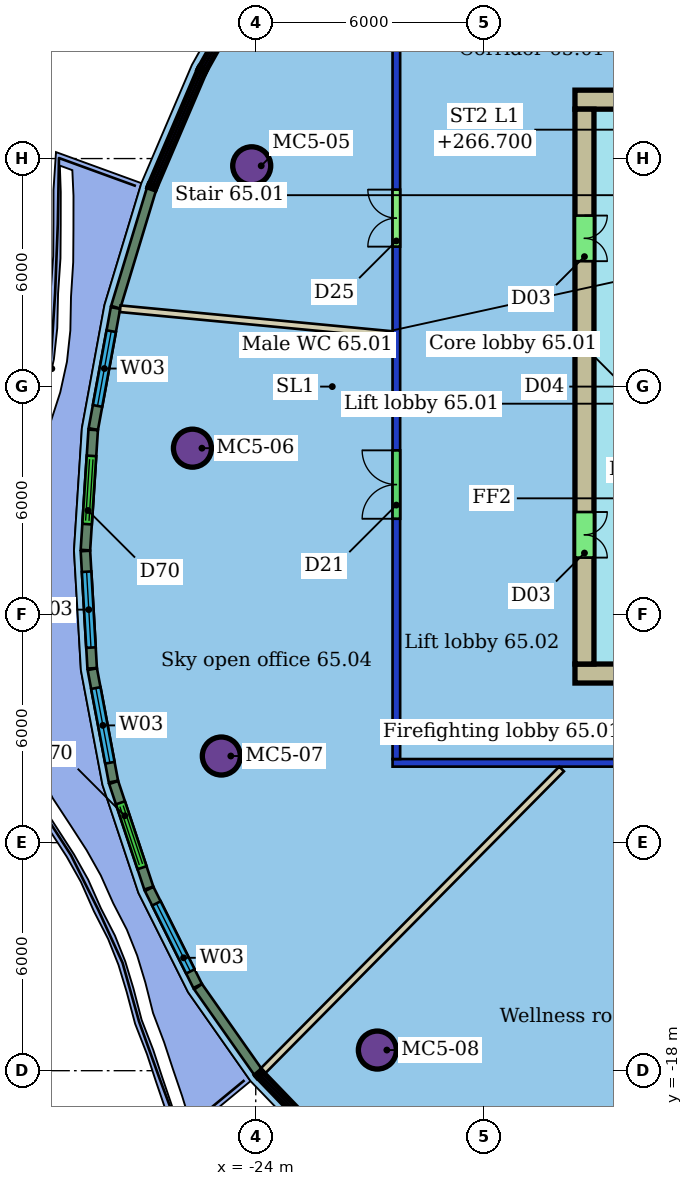
"""IFC4 building model, lengths in metres.
Left out: names, types, materials, properties, quantities, classifications, styles, units other than length and angle.
Written with IfcOpenShell. Run it as: python <this file> out.ifc"""

import sys

from ifc_helpers import new_model, si_unit, direction, frame, frame_2d, origin, origin_2d, place, context, subcontext, project, spatial, rectangle, hollow_circle, extrude, element, fill, save


model = new_model("IFC4")
c1 = context("Model", 3, precision=1e-05, world=origin(), true_north=direction((0.0, 1.0)))
c2 = subcontext(c1, "Body", "Model", "MODEL_VIEW")
j1 = project(units=[si_unit("LENGTHUNIT", "METRE"), si_unit("PLANEANGLEUNIT", "RADIAN")], contexts=[c1])
p1 = place(None, origin())
s1 = spatial("IfcSite", under=j1, at=p1, CompositionType="ELEMENT")
p2 = place(p1, origin())
s2 = spatial("IfcBuilding", under=s1, at=p2, CompositionType="ELEMENT")
p3 = place(p2, frame((0.0, 0.0, 264.9)))
s3 = spatial("IfcBuildingStorey", under=s2, at=p3, CompositionType="ELEMENT", Elevation=264.9)
for number, where, z_axis, x_axis in (
    (1, (-24.106, 5.81, 0.0), (0.0, 0.0, 1.0), (1.0, 0.0, 0.0)),
    (2, (-25.666, -1.62, 0.0), (0.0, 0.0, 1.0), (1.0, 0.0, 0.0)),
    (3, (-24.906, -9.72, 0.0), (0.0, 0.0, 1.0), (1.0, 0.0, 0.0)),
    (4, (-20.8, -17.457, 0.0), (0.0, 0.0, 1.0), (1.0, 0.0, 0.0)),
):
    element("IfcColumn", number, at=place(p3, frame(where, z_axis=z_axis, x_axis=x_axis)), inside=s3, PredefinedType="COLUMN", context=c2, shape_type="SweptSolid", body=[
        extrude(hollow_circle(Radius=0.5, WallThickness=0.04, at=origin_2d()), origin(), (0.0, 0.0, 1.0), 3.45),
    ])
p4 = place(p3, frame((8.4, -9.9, 0.0), z_axis=(0.0, 0.0, 1.0), x_axis=(-1.0, 0.0, 0.0)))
e5 = element("IfcWall", 5, at=p4, inside=s3, PredefinedType="PARTITIONING", context=c2, shape_type="SweptSolid", body=[
    extrude(rectangle(XDim=28.8, YDim=0.2, at=frame_2d((14.4, 0.0))), origin(), (0.0, 0.0, 1.0), 3.1),
])
p5 = place(p4, frame((18.96, 0.0, 0.0)))
e6 = element("IfcOpeningElement", 6, at=p5, cuts=e5, PredefinedType="OPENING", context=c2, shape_type="SweptSolid", body=[
    extrude(rectangle(XDim=1.0, YDim=2.1, at=frame_2d((0.5, 1.05))), frame((0.0, 0.11, 0.0), z_axis=(0.0, -1.0, 0.0), x_axis=(1.0, 0.0, 0.0)), (0.0, 0.0, 1.0), 0.22),
])
p6 = place(p4, frame((14.549, 0.0, 0.0)))
e7 = element("IfcOpeningElement", 7, at=p6, cuts=e5, PredefinedType="OPENING", context=c2, shape_type="SweptSolid", body=[
    extrude(rectangle(XDim=0.9, YDim=2.1, at=frame_2d((0.45, 1.05))), frame((0.0, 0.11, 0.0), z_axis=(0.0, -1.0, 0.0), x_axis=(1.0, 0.0, 0.0)), (0.0, 0.0, 1.0), 0.22),
])
p7 = place(p4, frame((9.362, 0.0, 0.0)))
e8 = element("IfcOpeningElement", 8, at=p7, cuts=e5, PredefinedType="OPENING", context=c2, shape_type="SweptSolid", body=[
    extrude(rectangle(XDim=1.0, YDim=2.1, at=frame_2d((0.5, 1.05))), frame((0.0, 0.11, 0.0), z_axis=(0.0, -1.0, 0.0), x_axis=(1.0, 0.0, 0.0)), (0.0, 0.0, 1.0), 0.22),
])
p8 = place(p4, frame((4.686, 0.0, 0.0)))
e9 = element("IfcOpeningElement", 9, at=p8, cuts=e5, PredefinedType="OPENING", context=c2, shape_type="SweptSolid", body=[
    extrude(rectangle(XDim=1.5, YDim=2.1, at=frame_2d((0.75, 1.05))), frame((0.0, 0.11, 0.0), z_axis=(0.0, -1.0, 0.0), x_axis=(1.0, 0.0, 0.0)), (0.0, 0.0, 1.0), 0.22),
])
p9 = place(p3, frame((-20.3, -9.8, 0.0), z_axis=(0.0, 0.0, 1.0), x_axis=(0.0, 1.0, 0.0)))
e10 = element("IfcWall", 10, at=p9, inside=s3, PredefinedType="PARTITIONING", context=c2, shape_type="SweptSolid", body=[
    extrude(rectangle(XDim=19.6, YDim=0.2, at=frame_2d((9.8, 0.0))), origin(), (0.0, 0.0, 1.0), 3.1),
])
p10 = place(p9, frame((13.483, 0.0, 0.0)))
e11 = element("IfcOpeningElement", 11, at=p10, cuts=e10, PredefinedType="OPENING", context=c2, shape_type="SweptSolid", body=[
    extrude(rectangle(XDim=1.5, YDim=2.4, at=frame_2d((0.75, 1.2))), frame((0.0, 0.11, 0.0), z_axis=(0.0, -1.0, 0.0), x_axis=(1.0, 0.0, 0.0)), (0.0, 0.0, 1.0), 0.22),
])
p11 = place(p9, frame((6.323, 0.0, 0.0)))
e12 = element("IfcOpeningElement", 12, at=p11, cuts=e10, PredefinedType="OPENING", context=c2, shape_type="SweptSolid", body=[
    extrude(rectangle(XDim=1.8, YDim=2.1, at=frame_2d((0.9, 1.05))), frame((0.0, 0.11, 0.0), z_axis=(0.0, -1.0, 0.0), x_axis=(1.0, 0.0, 0.0)), (0.0, 0.0, 1.0), 0.22),
])
p12 = place(p3, frame((-27.567, 2.049, 0.0), z_axis=(0.0, 0.0, 1.0), x_axis=(0.995516809143, -0.094584791129, 0.0)))
e13 = element("IfcWall", 13, at=p12, inside=s3, PredefinedType="PARTITIONING", context=c2, shape_type="SweptSolid", body=[
    extrude(rectangle(XDim=7.191, YDim=0.175, at=frame_2d((3.596, 0.0))), origin(), (0.0, 0.0, 1.0), 3.45),
])
p13 = place(p3, frame((-23.809, -18.004, 0.0), z_axis=(0.0, 0.0, 1.0), x_axis=(0.703239034198, 0.710953487073, 0.0)))
e14 = element("IfcWall", 14, at=p13, inside=s3, PredefinedType="PARTITIONING", context=c2, shape_type="SweptSolid", body=[
    extrude(rectangle(XDim=11.171, YDim=0.175, at=frame_2d((5.586, 0.0))), origin(), (0.0, 0.0, 1.0), 3.45),
])
p14 = place(p3, frame((-26.744, 5.197, 0.0), z_axis=(0.0, 0.0, 1.0), x_axis=(-0.289926029866, -0.957049056844, 0.0)))
e15 = element("IfcWall", 15, at=p14, inside=s3, PredefinedType="SOLIDWALL", context=c2, shape_type="SweptSolid", body=[
    extrude(rectangle(XDim=3.248, YDim=0.25, at=frame_2d((1.624, 0.0))), origin(), (0.0, 0.0, 1.0), 3.15),
])
p15 = place(p3, frame((-27.691, 2.067, 0.0), z_axis=(0.0, 0.0, 1.0), x_axis=(-0.180457976696, -0.983582695378, 0.0)))
e16 = element("IfcWall", 16, at=p15, inside=s3, PredefinedType="SOLIDWALL", context=c2, shape_type="SweptSolid", body=[
    extrude(rectangle(XDim=3.238, YDim=0.25, at=frame_2d((1.619, 0.0))), origin(), (0.0, 0.0, 1.0), 3.15),
])
p16 = place(p15, frame((0.619, 0.0, 0.9)))
e17 = element("IfcOpeningElement", 17, at=p16, cuts=e16, PredefinedType="OPENING", context=c2, shape_type="SweptSolid", body=[
    extrude(rectangle(XDim=2.0, YDim=2.1, at=frame_2d((1.0, 1.05))), frame((0.0, 0.135, 0.0), z_axis=(0.0, -1.0, 0.0), x_axis=(1.0, 0.0, 0.0)), (0.0, 0.0, 1.0), 0.27),
])
p17 = place(p3, frame((-28.278, -1.139, 0.0), z_axis=(0.0, 0.0, 1.0), x_axis=(-0.064473835275, -0.99791939783, 0.0)))
e18 = element("IfcWall", 18, at=p17, inside=s3, PredefinedType="SOLIDWALL", context=c2, shape_type="SweptSolid", body=[
    extrude(rectangle(XDim=3.169, YDim=0.25, at=frame_2d((1.585, 0.0))), origin(), (0.0, 0.0, 1.0), 3.15),
])
p18 = place(p17, frame((0.685, 0.0, 0.0)))
e19 = element("IfcOpeningElement", 19, at=p18, cuts=e18, PredefinedType="OPENING", context=c2, shape_type="SweptSolid", body=[
    extrude(rectangle(XDim=1.8, YDim=2.4, at=frame_2d((0.9, 1.2))), frame((0.0, 0.135, 0.0), z_axis=(0.0, -1.0, 0.0), x_axis=(1.0, 0.0, 0.0)), (0.0, 0.0, 1.0), 0.27),
])
p19 = place(p3, frame((-28.482, -4.325, 0.0), z_axis=(0.0, 0.0, 1.0), x_axis=(0.057643453345, -0.998337233747, 0.0)))
e20 = element("IfcWall", 20, at=p19, inside=s3, PredefinedType="SOLIDWALL", context=c2, shape_type="SweptSolid", body=[
    extrude(rectangle(XDim=3.092, YDim=0.25, at=frame_2d((1.546, 0.0))), origin(), (0.0, 0.0, 1.0), 3.15),
])
p20 = place(p19, frame((0.546, 0.0, 0.9)))
e21 = element("IfcOpeningElement", 21, at=p20, cuts=e20, PredefinedType="OPENING", context=c2, shape_type="SweptSolid", body=[
    extrude(rectangle(XDim=2.0, YDim=2.1, at=frame_2d((1.0, 1.05))), frame((0.0, 0.135, 0.0), z_axis=(0.0, -1.0, 0.0), x_axis=(1.0, 0.0, 0.0)), (0.0, 0.0, 1.0), 0.27),
])
p21 = place(p3, frame((-28.301, -7.436, 0.0), z_axis=(0.0, 0.0, 1.0), x_axis=(0.184915563493, -0.982754412037, 0.0)))
e22 = element("IfcWall", 22, at=p21, inside=s3, PredefinedType="SOLIDWALL", context=c2, shape_type="SweptSolid", body=[
    extrude(rectangle(XDim=3.009, YDim=0.25, at=frame_2d((1.504, 0.0))), origin(), (0.0, 0.0, 1.0), 3.15),
])
p22 = place(p21, frame((0.505, 0.0, 0.9)))
e23 = element("IfcOpeningElement", 23, at=p22, cuts=e22, PredefinedType="OPENING", context=c2, shape_type="SweptSolid", body=[
    extrude(rectangle(XDim=2.0, YDim=2.1, at=frame_2d((1.0, 1.05))), frame((0.0, 0.135, 0.0), z_axis=(0.0, -1.0, 0.0), x_axis=(1.0, 0.0, 0.0)), (0.0, 0.0, 1.0), 0.27),
])
p23 = place(p3, frame((-27.739, -10.417, 0.0), z_axis=(0.0, 0.0, 1.0), x_axis=(0.315802326968, -0.948825005089, 0.0)))
e24 = element("IfcWall", 24, at=p23, inside=s3, PredefinedType="SOLIDWALL", context=c2, shape_type="SweptSolid", body=[
    extrude(rectangle(XDim=2.927, YDim=0.25, at=frame_2d((1.463, 0.0))), origin(), (0.0, 0.0, 1.0), 3.15),
])
p24 = place(p23, frame((0.563, 0.0, 0.0)))
e25 = element("IfcOpeningElement", 25, at=p24, cuts=e24, PredefinedType="OPENING", context=c2, shape_type="SweptSolid", body=[
    extrude(rectangle(XDim=1.8, YDim=2.4, at=frame_2d((0.9, 1.2))), frame((0.0, 0.135, 0.0), z_axis=(0.0, -1.0, 0.0), x_axis=(1.0, 0.0, 0.0)), (0.0, 0.0, 1.0), 0.27),
])
p25 = place(p3, frame((-26.804, -13.218, 0.0), z_axis=(0.0, 0.0, 1.0), x_axis=(0.447145092451, -0.894461439246, 0.0)))
e26 = element("IfcWall", 26, at=p25, inside=s3, PredefinedType="SOLIDWALL", context=c2, shape_type="SweptSolid", body=[
    extrude(rectangle(XDim=2.851, YDim=0.25, at=frame_2d((1.426, 0.0))), origin(), (0.0, 0.0, 1.0), 3.15),
])
p26 = place(p25, frame((0.426, 0.0, 0.9)))
e27 = element("IfcOpeningElement", 27, at=p26, cuts=e26, PredefinedType="OPENING", context=c2, shape_type="SweptSolid", body=[
    extrude(rectangle(XDim=2.0, YDim=2.1, at=frame_2d((1.0, 1.05))), frame((0.0, 0.135, 0.0), z_axis=(0.0, -1.0, 0.0), x_axis=(1.0, 0.0, 0.0)), (0.0, 0.0, 1.0), 0.27),
])
p27 = place(p3, frame((-25.516, -15.791, 0.0), z_axis=(0.0, 0.0, 1.0), x_axis=(0.574964816713, -0.818178134358, 0.0)))
e28 = element("IfcWall", 28, at=p27, inside=s3, PredefinedType="SOLIDWALL", context=c2, shape_type="SweptSolid", body=[
    extrude(rectangle(XDim=2.746, YDim=0.25, at=frame_2d((1.373, 0.0))), origin(), (0.0, 0.0, 1.0), 3.15),
])
p28 = place(p3, frame((-6.0, 7.55, 0.0), z_axis=(0.0, 0.0, 1.0), x_axis=(-1.0, 0.0, 0.0)))
e29 = element("IfcWall", 29, at=p28, inside=s3, PredefinedType="SHEAR", context=c2, shape_type="SweptSolid", body=[
    extrude(rectangle(XDim=9.6, YDim=0.5, at=frame_2d((4.8, 0.0))), origin(), (0.0, 0.0, 1.0), 3.3),
])
p29 = place(p28, frame((5.2, 0.0, 0.0)))
e30 = element("IfcOpeningElement", 30, at=p29, cuts=e29, PredefinedType="OPENING", context=c2, shape_type="SweptSolid", body=[
    extrude(rectangle(XDim=1.2, YDim=2.1, at=frame_2d((0.6, 1.05))), frame((0.0, 0.26, 0.0), z_axis=(0.0, -1.0, 0.0), x_axis=(1.0, 0.0, 0.0)), (0.0, 0.0, 1.0), 0.52),
])
p30 = place(p3, frame((-15.6, -7.55, 0.0), z_axis=(0.0, 0.0, 1.0), x_axis=(1.0, 0.0, 0.0)))
e31 = element("IfcWall", 31, at=p30, inside=s3, PredefinedType="SHEAR", context=c2, shape_type="SweptSolid", body=[
    extrude(rectangle(XDim=19.2, YDim=0.5, at=frame_2d((9.6, 0.0))), origin(), (0.0, 0.0, 1.0), 3.3),
])
p31 = place(p30, frame((3.6, 0.0, 0.0)))
e32 = element("IfcOpeningElement", 32, at=p31, cuts=e31, PredefinedType="OPENING", context=c2, shape_type="SweptSolid", body=[
    extrude(rectangle(XDim=1.2, YDim=2.1, at=frame_2d((0.6, 1.05))), frame((0.0, 0.26, 0.0), z_axis=(0.0, -1.0, 0.0), x_axis=(1.0, 0.0, 0.0)), (0.0, 0.0, 1.0), 0.52),
])
p32 = place(p3, frame((-15.35, 7.3, 0.0), z_axis=(0.0, 0.0, 1.0), x_axis=(0.0, -1.0, 0.0)))
e33 = element("IfcWall", 33, at=p32, inside=s3, PredefinedType="SHEAR", context=c2, shape_type="SweptSolid", body=[
    extrude(rectangle(XDim=14.6, YDim=0.5, at=frame_2d((7.3, 0.0))), origin(), (0.0, 0.0, 1.0), 3.3),
])
p33 = place(p32, frame((10.6, 0.0, 0.0)))
e34 = element("IfcOpeningElement", 34, at=p33, cuts=e33, PredefinedType="OPENING", context=c2, shape_type="SweptSolid", body=[
    extrude(rectangle(XDim=1.2, YDim=2.1, at=frame_2d((0.6, 1.05))), frame((0.0, 0.26, 0.0), z_axis=(0.0, -1.0, 0.0), x_axis=(1.0, 0.0, 0.0)), (0.0, 0.0, 1.0), 0.52),
])
p34 = place(p32, frame((2.8, 0.0, 0.0)))
e35 = element("IfcOpeningElement", 35, at=p34, cuts=e33, PredefinedType="OPENING", context=c2, shape_type="SweptSolid", body=[
    extrude(rectangle(XDim=1.2, YDim=2.1, at=frame_2d((0.6, 1.05))), frame((0.0, 0.26, 0.0), z_axis=(0.0, -1.0, 0.0), x_axis=(1.0, 0.0, 0.0)), (0.0, 0.0, 1.0), 0.52),
])
p35 = place(p10, origin())
e36 = element("IfcDoor", 36, at=p35, inside=s3, OperationType="DOUBLE_DOOR_SINGLE_SWING", PredefinedType="DOOR", context=c2, shape_type="SweptSolid", body=[
    extrude(rectangle(XDim=1.5, YDim=2.4, at=frame_2d((0.75, 1.2))), frame((0.0, 0.025, 0.0), z_axis=(0.0, -1.0, 0.0), x_axis=(1.0, 0.0, 0.0)), (0.0, 0.0, 1.0), 0.05),
])
fill(e11, e36)
p36 = place(p11, origin())
e37 = element("IfcDoor", 37, at=p36, inside=s3, OperationType="DOUBLE_DOOR_SINGLE_SWING", PredefinedType="DOOR", context=c2, shape_type="SweptSolid", body=[
    extrude(rectangle(XDim=1.8, YDim=2.1, at=frame_2d((0.9, 1.05))), frame((0.0, 0.025, 0.0), z_axis=(0.0, -1.0, 0.0), x_axis=(1.0, 0.0, 0.0)), (0.0, 0.0, 1.0), 0.05),
])
fill(e12, e37)
p37 = place(p16, origin())
e38 = element("IfcWindow", 38, at=p37, inside=s3, PartitioningType="SINGLE_PANEL", PredefinedType="WINDOW", context=c2, shape_type="SweptSolid", body=[
    extrude(rectangle(XDim=2.0, YDim=2.1, at=frame_2d((1.0, 1.05))), frame((0.0, 0.03, 0.0), z_axis=(0.0, -1.0, 0.0), x_axis=(1.0, 0.0, 0.0)), (0.0, 0.0, 1.0), 0.06),
])
fill(e17, e38)
p38 = place(p18, origin())
e39 = element("IfcDoor", 39, at=p38, inside=s3, OperationType="DOUBLE_DOOR_SLIDING", PredefinedType="DOOR", context=c2, shape_type="SweptSolid", body=[
    extrude(rectangle(XDim=1.8, YDim=2.4, at=frame_2d((0.9, 1.2))), frame((0.0, 0.025, 0.0), z_axis=(0.0, -1.0, 0.0), x_axis=(1.0, 0.0, 0.0)), (0.0, 0.0, 1.0), 0.05),
])
fill(e19, e39)
p39 = place(p20, origin())
e40 = element("IfcWindow", 40, at=p39, inside=s3, PartitioningType="SINGLE_PANEL", PredefinedType="WINDOW", context=c2, shape_type="SweptSolid", body=[
    extrude(rectangle(XDim=2.0, YDim=2.1, at=frame_2d((1.0, 1.05))), frame((0.0, 0.03, 0.0), z_axis=(0.0, -1.0, 0.0), x_axis=(1.0, 0.0, 0.0)), (0.0, 0.0, 1.0), 0.06),
])
fill(e21, e40)
p40 = place(p22, origin())
e41 = element("IfcWindow", 41, at=p40, inside=s3, PartitioningType="SINGLE_PANEL", PredefinedType="WINDOW", context=c2, shape_type="SweptSolid", body=[
    extrude(rectangle(XDim=2.0, YDim=2.1, at=frame_2d((1.0, 1.05))), frame((0.0, 0.03, 0.0), z_axis=(0.0, -1.0, 0.0), x_axis=(1.0, 0.0, 0.0)), (0.0, 0.0, 1.0), 0.06),
])
fill(e23, e41)
p41 = place(p24, origin())
e42 = element("IfcDoor", 42, at=p41, inside=s3, OperationType="DOUBLE_DOOR_SLIDING", PredefinedType="DOOR", context=c2, shape_type="SweptSolid", body=[
    extrude(rectangle(XDim=1.8, YDim=2.4, at=frame_2d((0.9, 1.2))), frame((0.0, 0.025, 0.0), z_axis=(0.0, -1.0, 0.0), x_axis=(1.0, 0.0, 0.0)), (0.0, 0.0, 1.0), 0.05),
])
fill(e25, e42)
p42 = place(p26, origin())
e43 = element("IfcWindow", 43, at=p42, inside=s3, PartitioningType="SINGLE_PANEL", PredefinedType="WINDOW", context=c2, shape_type="SweptSolid", body=[
    extrude(rectangle(XDim=2.0, YDim=2.1, at=frame_2d((1.0, 1.05))), frame((0.0, 0.03, 0.0), z_axis=(0.0, -1.0, 0.0), x_axis=(1.0, 0.0, 0.0)), (0.0, 0.0, 1.0), 0.06),
])
fill(e27, e43)
p43 = place(p33, origin())
e44 = element("IfcDoor", 44, at=p43, inside=s3, OperationType="DOUBLE_DOOR_SINGLE_SWING", PredefinedType="NOTDEFINED", context=c2, shape_type="SweptSolid", body=[
    extrude(rectangle(XDim=1.2, YDim=2.1, at=frame_2d((0.6, 1.05))), frame((0.0, 0.025, 0.0), z_axis=(0.0, -1.0, 0.0), x_axis=(1.0, 0.0, 0.0)), (0.0, 0.0, 1.0), 0.05),
])
fill(e34, e44)
p44 = place(p34, origin())
e45 = element("IfcDoor", 45, at=p44, inside=s3, OperationType="DOUBLE_DOOR_SINGLE_SWING", PredefinedType="NOTDEFINED", context=c2, shape_type="SweptSolid", body=[
    extrude(rectangle(XDim=1.2, YDim=2.1, at=frame_2d((0.6, 1.05))), frame((0.0, 0.025, 0.0), z_axis=(0.0, -1.0, 0.0), x_axis=(1.0, 0.0, 0.0)), (0.0, 0.0, 1.0), 0.05),
])
fill(e35, e45)
save(model, sys.argv[1])
